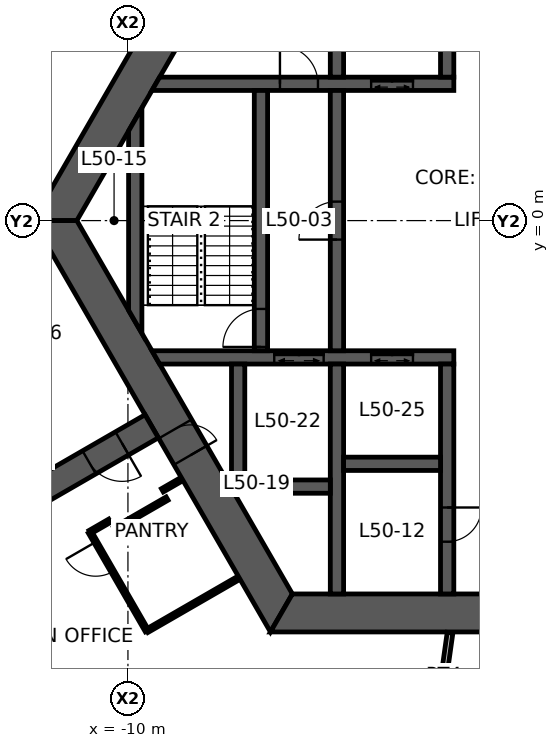
"""IFC4 building model, lengths in metres.
Left out: names, types, materials, properties, quantities, classifications, styles, units other than length and angle.
Written with IfcOpenShell. Run it as: python <this file> out.ifc"""

import sys

from ifc_helpers import new_model, si_unit, direction, frame, frame_2d, origin, place, context, subcontext, project, spatial, polyline, rectangle, outline, extrude, element, fill, save


model = new_model("IFC4")
c1 = context("Model", 3, precision=1e-05, world=origin(), true_north=direction((0.0, 1.0)))
c2 = subcontext(c1, "Body", "Model", "MODEL_VIEW")
j1 = project(units=[si_unit("LENGTHUNIT", "METRE"), si_unit("PLANEANGLEUNIT", "RADIAN")], contexts=[c1])
p1 = place(None, origin())
s1 = spatial("IfcSite", under=j1, at=p1, CompositionType="ELEMENT")
p2 = place(p1, origin())
s2 = spatial("IfcBuilding", under=s1, at=p2, CompositionType="ELEMENT")
p3 = place(p2, frame((0.0, 0.0, 199.4)))
s3 = spatial("IfcBuildingStorey", under=s2, at=p3, CompositionType="ELEMENT", Elevation=199.4)
p4 = place(p3, frame((-5.961, 10.325, 0.0), z_axis=(0.0, 0.0, 1.0), x_axis=(-0.500004296715, -0.866022923061, 0.0)))
e1 = element("IfcWall", 1, at=p4, inside=s3, PredefinedType="SHEAR", context=c2, shape_type="SweptSolid", body=[
    extrude(outline(polyline([(-0.289, -0.5), (4.494, -0.5), (5.494, -0.5), (12.211, -0.5), (11.634, 0.5), (5.494, 0.5), (4.494, 0.5), (0.289, 0.5), (-0.289, -0.5)])), origin(), (0.0, 0.0, 1.0), 3.9),
])
p5 = place(p4, frame((4.494, 0.0, 0.0)))
e2 = element("IfcOpeningElement", 2, at=p5, cuts=e1, PredefinedType="OPENING", context=c2, shape_type="SweptSolid", body=[
    extrude(rectangle(XDim=1.0, YDim=2.1, at=frame_2d((0.5, 1.05))), frame((0.0, 0.51, 0.0), z_axis=(0.0, -1.0, 0.0), x_axis=(1.0, 0.0, 0.0)), (0.0, 0.0, 1.0), 1.02),
])
p6 = place(p3, frame((-11.922, 0.0, 0.0), z_axis=(0.0, 0.0, 1.0), x_axis=(0.500004296715, -0.866022923061, 0.0)))
e3 = element("IfcWall", 3, at=p6, inside=s3, PredefinedType="SHEAR", context=c2, shape_type="SweptSolid", body=[
    extrude(outline(polyline([(-0.289, -0.5), (6.331, -0.5), (7.131, -0.5), (12.211, -0.5), (11.634, 0.5), (7.131, 0.5), (6.331, 0.5), (0.289, 0.5), (-0.289, -0.5)])), origin(), (0.0, 0.0, 1.0), 3.9),
])
p7 = place(p6, frame((6.331, 0.0, 0.0)))
e4 = element("IfcOpeningElement", 4, at=p7, cuts=e3, PredefinedType="OPENING", context=c2, shape_type="SweptSolid", body=[
    extrude(rectangle(XDim=0.8, YDim=2.1, at=frame_2d((0.4, 1.05))), frame((0.0, 0.51, 0.0), z_axis=(0.0, -1.0, 0.0), x_axis=(1.0, 0.0, 0.0)), (0.0, 0.0, 1.0), 1.02),
])
p8 = place(p3, frame((-5.961, -10.325, 0.0), z_axis=(0.0, 0.0, 1.0), x_axis=(1.0, 0.0, 0.0)))
e5 = element("IfcWall", 5, at=p8, inside=s3, PredefinedType="SHEAR", context=c2, shape_type="SweptSolid", body=[
    extrude(outline(polyline([(-0.289, -0.5), (5.461, -0.5), (6.461, -0.5), (12.211, -0.5), (11.634, 0.5), (6.461, 0.5), (5.461, 0.5), (0.289, 0.5), (-0.289, -0.5)])), origin(), (0.0, 0.0, 1.0), 3.9),
])
p9 = place(p8, frame((5.461, 0.0, 0.0)))
e6 = element("IfcOpeningElement", 6, at=p9, cuts=e5, PredefinedType="OPENING", context=c2, shape_type="SweptSolid", body=[
    extrude(rectangle(XDim=1.0, YDim=2.1, at=frame_2d((0.5, 1.05))), frame((0.0, 0.51, 0.0), z_axis=(0.0, -1.0, 0.0), x_axis=(1.0, 0.0, 0.0)), (0.0, 0.0, 1.0), 1.02),
])
p10 = place(p3, frame((-9.375, -5.413, 0.0), z_axis=(0.0, 0.0, 1.0), x_axis=(-0.866032377459, -0.499987921047, 0.0)))
e7 = element("IfcWall", 7, at=p10, inside=s3, PredefinedType="SHEAR", context=c2, shape_type="SweptSolid", body=[
    extrude(rectangle(XDim=7.696, YDim=0.7, at=frame_2d((3.848, 0.0))), origin(), (0.0, 0.0, 1.0), 3.9),
])
p11 = place(p10, frame((0.9, 0.0, 0.0)))
e8 = element("IfcOpeningElement", 8, at=p11, cuts=e7, PredefinedType="OPENING", context=c2, shape_type="SweptSolid", body=[
    extrude(rectangle(XDim=1.0, YDim=2.1, at=frame_2d((0.5, 1.05))), frame((0.0, 0.36, 0.0), z_axis=(0.0, -1.0, 0.0), x_axis=(1.0, 0.0, 0.0)), (0.0, 0.0, 1.0), 0.72),
])
p12 = place(p3, frame((-9.266, 3.6, 0.0), z_axis=(0.0, 0.0, 1.0), x_axis=(1.0, 0.0, 0.0)))
e9 = element("IfcWall", 9, at=p12, inside=s3, PredefinedType="SHEAR", context=c2, shape_type="SweptSolid", body=[
    extrude(outline(polyline([(-0.101, -0.175), (3.266, -0.175), (4.266, -0.175), (5.667, -0.175), (6.767, -0.175), (7.841, -0.175), (7.841, 0.175), (6.767, 0.175), (5.667, 0.175), (4.266, 0.175), (3.266, 0.175), (0.101, 0.175), (-0.101, -0.175)])), origin(), (0.0, 0.0, 1.0), 3.9),
])
p13 = place(p12, frame((3.266, 0.0, 0.0)))
e10 = element("IfcOpeningElement", 10, at=p13, cuts=e9, PredefinedType="OPENING", context=c2, shape_type="SweptSolid", body=[
    extrude(rectangle(XDim=1.0, YDim=2.1, at=frame_2d((0.5, 1.05))), frame((0.0, 0.185, 0.0), z_axis=(0.0, -1.0, 0.0), x_axis=(1.0, 0.0, 0.0)), (0.0, 0.0, 1.0), 0.37),
])
p14 = place(p12, frame((5.667, 0.0, 0.0)))
e11 = element("IfcOpeningElement", 11, at=p14, cuts=e9, PredefinedType="OPENING", context=c2, shape_type="SweptSolid", body=[
    extrude(rectangle(XDim=1.1, YDim=2.1, at=frame_2d((0.55, 1.05))), frame((0.0, 0.185, 0.0), z_axis=(0.0, -1.0, 0.0), x_axis=(1.0, 0.0, 0.0)), (0.0, 0.0, 1.0), 0.37),
])
p15 = place(p3, frame((-9.266, -3.6, 0.0), z_axis=(0.0, 0.0, 1.0), x_axis=(1.0, 0.0, 0.0)))
e12 = element("IfcWall", 12, at=p15, inside=s3, PredefinedType="SHEAR", context=c2, shape_type="SweptSolid", body=[
    extrude(outline(polyline([(0.101, -0.175), (3.116, -0.175), (4.417, -0.175), (5.667, -0.175), (6.767, -0.175), (7.841, -0.175), (7.841, 0.175), (6.767, 0.175), (5.667, 0.175), (4.417, 0.175), (3.116, 0.175), (-0.101, 0.175), (0.101, -0.175)])), origin(), (0.0, 0.0, 1.0), 3.9),
])
p16 = place(p15, frame((5.667, 0.0, 0.0)))
e13 = element("IfcOpeningElement", 13, at=p16, cuts=e12, PredefinedType="OPENING", context=c2, shape_type="SweptSolid", body=[
    extrude(rectangle(XDim=1.1, YDim=2.1, at=frame_2d((0.55, 1.05))), frame((0.0, 0.185, 0.0), z_axis=(0.0, -1.0, 0.0), x_axis=(1.0, 0.0, 0.0)), (0.0, 0.0, 1.0), 0.37),
])
p17 = place(p15, frame((3.116, 0.0, 0.0)))
e14 = element("IfcOpeningElement", 14, at=p17, cuts=e12, PredefinedType="OPENING", context=c2, shape_type="SweptSolid", body=[
    extrude(rectangle(XDim=1.3, YDim=2.1, at=frame_2d((0.65, 1.05))), frame((0.0, 0.185, 0.0), z_axis=(0.0, -1.0, 0.0), x_axis=(1.0, 0.0, 0.0)), (0.0, 0.0, 1.0), 0.37),
])
p18 = place(p3, frame((-1.6, 3.775, 0.0), z_axis=(0.0, 0.0, 1.0), x_axis=(0.0, 1.0, 0.0)))
e15 = element("IfcWall", 15, at=p18, inside=s3, PredefinedType="SHEAR", context=c2, shape_type="SweptSolid", body=[
    extrude(rectangle(XDim=6.05, YDim=0.35, at=frame_2d((3.025, 0.0))), origin(), (0.0, 0.0, 1.0), 3.9),
])
p19 = place(p18, frame((3.775, 0.0, 0.0)))
e16 = element("IfcOpeningElement", 16, at=p19, cuts=e15, PredefinedType="OPENING", context=c2, shape_type="SweptSolid", body=[
    extrude(rectangle(XDim=0.9, YDim=2.1, at=frame_2d((0.45, 1.05))), frame((0.0, 0.185, 0.0), z_axis=(0.0, -1.0, 0.0), x_axis=(1.0, 0.0, 0.0)), (0.0, 0.0, 1.0), 0.37),
])
p20 = place(p3, frame((-1.6, -3.775, 0.0), z_axis=(0.0, 0.0, 1.0), x_axis=(0.0, -1.0, 0.0)))
e17 = element("IfcWall", 17, at=p20, inside=s3, PredefinedType="SHEAR", context=c2, shape_type="SweptSolid", body=[
    extrude(rectangle(XDim=6.05, YDim=0.35, at=frame_2d((3.025, 0.0))), origin(), (0.0, 0.0, 1.0), 3.9),
])
p21 = place(p20, frame((3.775, 0.0, 0.0)))
e18 = element("IfcOpeningElement", 18, at=p21, cuts=e17, PredefinedType="OPENING", context=c2, shape_type="SweptSolid", body=[
    extrude(rectangle(XDim=0.9, YDim=2.1, at=frame_2d((0.45, 1.05))), frame((0.0, 0.185, 0.0), z_axis=(0.0, -1.0, 0.0), x_axis=(1.0, 0.0, 0.0)), (0.0, 0.0, 1.0), 0.37),
])
p22 = place(p3, frame((-4.5, -3.425, 0.0), z_axis=(0.0, 0.0, 1.0), x_axis=(0.0, 1.0, 0.0)))
e19 = element("IfcWall", 19, at=p22, inside=s3, PredefinedType="SHEAR", context=c2, shape_type="SweptSolid", body=[
    extrude(rectangle(XDim=6.85, YDim=0.35, at=frame_2d((3.425, 0.0))), origin(), (0.0, 0.0, 1.0), 3.9),
])
p23 = place(p22, frame((2.925, 0.0, 0.0)))
e20 = element("IfcOpeningElement", 20, at=p23, cuts=e19, PredefinedType="OPENING", context=c2, shape_type="SweptSolid", body=[
    extrude(rectangle(XDim=1.0, YDim=2.1, at=frame_2d((0.5, 1.05))), frame((0.0, 0.185, 0.0), z_axis=(0.0, -1.0, 0.0), x_axis=(1.0, 0.0, 0.0)), (0.0, 0.0, 1.0), 0.37),
])
p24 = place(p3, frame((-6.5, -3.425, 0.0), z_axis=(0.0, 0.0, 1.0), x_axis=(0.0, 1.0, 0.0)))
e21 = element("IfcWall", 21, at=p24, inside=s3, PredefinedType="SHEAR", context=c2, shape_type="SweptSolid", body=[
    extrude(rectangle(XDim=6.85, YDim=0.35, at=frame_2d((3.425, 0.0))), origin(), (0.0, 0.0, 1.0), 3.9),
])
p25 = place(p24, frame((0.1, 0.0, 0.0)))
e22 = element("IfcOpeningElement", 22, at=p25, cuts=e21, PredefinedType="OPENING", context=c2, shape_type="SweptSolid", body=[
    extrude(rectangle(XDim=1.0, YDim=2.1, at=frame_2d((0.5, 1.05))), frame((0.0, 0.185, 0.0), z_axis=(0.0, -1.0, 0.0), x_axis=(1.0, 0.0, 0.0)), (0.0, 0.0, 1.0), 0.37),
])
for number, where, z_axis, x_axis in (
    (23, (-4.5, 3.775, 0.0), (0.0, 0.0, 1.0), (0.0, 1.0, 0.0)),
    (24, (-4.5, -3.775, 0.0), (0.0, 0.0, 1.0), (0.0, -1.0, 0.0)),
):
    element("IfcWall", number, at=place(p3, frame(where, z_axis=z_axis, x_axis=x_axis)), inside=s3, PredefinedType="SHEAR", context=c2, shape_type="SweptSolid", body=[
        extrude(rectangle(XDim=6.05, YDim=0.35, at=frame_2d((3.025, 0.0))), origin(), (0.0, 0.0, 1.0), 3.9),
    ])
p26 = place(p3, frame((-4.325, -6.4, 0.0), z_axis=(0.0, 0.0, 1.0), x_axis=(1.0, 0.0, 0.0)))
e25 = element("IfcWall", 25, at=p26, inside=s3, PredefinedType="SHEAR", context=c2, shape_type="SweptSolid", body=[
    extrude(rectangle(XDim=2.55, YDim=0.35, at=frame_2d((1.275, 0.0))), origin(), (0.0, 0.0, 1.0), 3.9),
])
p27 = place(p3, frame((-6.925, -7.0, 0.0), z_axis=(0.0, 0.0, 1.0), x_axis=(1.0, 0.0, 0.0)))
e26 = element("IfcWall", 26, at=p27, inside=s3, PredefinedType="SHEAR", context=c2, shape_type="SweptSolid", body=[
    extrude(rectangle(XDim=2.25, YDim=0.35, at=frame_2d((1.125, 0.0))), origin(), (0.0, 0.0, 1.0), 3.9),
])
p28 = place(p3, frame((-7.1, -3.775, 0.0), z_axis=(0.0, 0.0, 1.0), x_axis=(0.0, -1.0, 0.0)))
e27 = element("IfcWall", 27, at=p28, inside=s3, PredefinedType="SHEAR", context=c2, shape_type="SweptSolid", body=[
    extrude(outline(polyline([(0.0, -0.175), (3.274, -0.175), (3.4, 0.0), (3.4, 0.175), (0.0, 0.175), (0.0, -0.175)])), origin(), (0.0, 0.0, 1.0), 3.9),
])
p29 = place(p3, frame((-9.808, -2.662, 0.0), z_axis=(0.0, 0.0, 1.0), x_axis=(0.0, 1.0, 0.0)))
e28 = element("IfcWall", 28, at=p29, inside=s3, PredefinedType="SHEAR", context=c2, shape_type="SweptSolid", body=[
    extrude(outline(polyline([(-0.303, -0.175), (5.628, -0.175), (5.021, 0.175), (0.303, 0.175), (-0.303, -0.175)])), origin(), (0.0, 0.0, 1.0), 3.9),
])
p30 = place(p3, frame((-15.156, 0.0, 0.0), z_axis=(0.0, 0.0, 1.0), x_axis=(0.500012970505, 0.86601791513, 0.0)))
e29 = element("IfcWall", 29, at=p30, inside=s3, PredefinedType="PARTITIONING", context=c2, shape_type="SweptSolid", body=[
    extrude(rectangle(XDim=11.591, YDim=0.15, at=frame_2d((5.795, 0.0))), origin(), (0.0, 0.0, 1.0), 2.35),
])
p31 = place(p30, frame((5.295, 0.0, 0.0)))
e30 = element("IfcOpeningElement", 30, at=p31, cuts=e29, PredefinedType="OPENING", context=c2, shape_type="SweptSolid", body=[
    extrude(rectangle(XDim=1.0, YDim=2.1, at=frame_2d((0.5, 1.05))), frame((0.0, 0.085, 0.0), z_axis=(0.0, -1.0, 0.0), x_axis=(1.0, 0.0, 0.0)), (0.0, 0.0, 1.0), 0.17),
])
p32 = place(p3, frame((-11.0, -8.198, 0.0), z_axis=(0.0, 0.0, 1.0), x_axis=(0.866131372301, 0.499816412211, 0.0)))
e31 = element("IfcWall", 31, at=p32, inside=s3, PredefinedType="PARTITIONING", context=c2, shape_type="SweptSolid", body=[
    extrude(rectangle(XDim=0.6, YDim=0.1, at=frame_2d((0.3, 0.0))), origin(), (0.0, 0.0, 1.0), 2.35),
])
p33 = place(p3, frame((-10.355, -8.115, 0.0), z_axis=(0.0, 0.0, 1.0), x_axis=(0.866094119867, 0.499880961361, 0.0)))
e32 = element("IfcWall", 32, at=p33, inside=s3, PredefinedType="PARTITIONING", context=c2, shape_type="SweptSolid", body=[
    extrude(rectangle(XDim=1.6, YDim=0.1, at=frame_2d((0.8, 0.0))), origin(), (0.0, 0.0, 1.0), 2.35),
])
p34 = place(p3, frame((-9.5, -10.796, 0.0), z_axis=(0.0, 0.0, 1.0), x_axis=(-0.499990139034, 0.866031096941, 0.0)))
e33 = element("IfcWall", 33, at=p34, inside=s3, PredefinedType="PARTITIONING", context=c2, shape_type="SweptSolid", body=[
    extrude(rectangle(XDim=3.0, YDim=0.1, at=frame_2d((1.5, 0.0))), origin(), (0.0, 0.0, 1.0), 2.35),
])
p35 = place(p34, frame((1.8, 0.0, 0.0)))
e34 = element("IfcOpeningElement", 34, at=p35, cuts=e33, PredefinedType="OPENING", context=c2, shape_type="SweptSolid", body=[
    extrude(rectangle(XDim=0.9, YDim=2.1, at=frame_2d((0.45, 1.05))), frame((0.0, 0.06, 0.0), z_axis=(0.0, -1.0, 0.0), x_axis=(1.0, 0.0, 0.0)), (0.0, 0.0, 1.0), 0.12),
])
p36 = place(p3, frame((-9.094, -7.098, 0.0), z_axis=(0.0, 0.0, 1.0), x_axis=(0.865954211699, 0.50012328804, 0.0)))
e35 = element("IfcWall", 35, at=p36, inside=s3, PredefinedType="PARTITIONING", context=c2, shape_type="SweptSolid", body=[
    extrude(rectangle(XDim=0.58, YDim=0.1, at=frame_2d((0.29, 0.0))), origin(), (0.0, 0.0, 1.0), 2.35),
])
p37 = place(p3, frame((-7.092, -9.406, 0.0), z_axis=(0.0, 0.0, 1.0), x_axis=(-0.86603494908, -0.499983466698, 0.0)))
e36 = element("IfcWall", 36, at=p37, inside=s3, PredefinedType="PARTITIONING", context=c2, shape_type="SweptSolid", body=[
    extrude(rectangle(XDim=2.78, YDim=0.1, at=frame_2d((1.39, 0.0))), origin(), (0.0, 0.0, 1.0), 2.35),
])
p38 = place(p3, frame((-1.844, -13.125, 0.0), z_axis=(0.0, 0.0, 1.0), x_axis=(0.139119980631, 0.990275532864, 0.0)))
e37 = element("IfcWall", 37, at=p38, inside=s3, PredefinedType="PARTITIONING", context=c2, shape_type="SweptSolid", body=[
    extrude(rectangle(XDim=2.302, YDim=0.15, at=frame_2d((1.151, 0.0))), origin(), (0.0, 0.0, 1.0), 2.35),
])
p39 = place(p7, origin())
e38 = element("IfcDoor", 38, at=p39, inside=s3, OperationType="SINGLE_SWING_RIGHT", PredefinedType="DOOR", context=c2, shape_type="SweptSolid", body=[
    extrude(rectangle(XDim=0.8, YDim=2.1, at=frame_2d((0.4, 1.05))), frame((0.0, 0.025, 0.0), z_axis=(0.0, -1.0, 0.0), x_axis=(1.0, 0.0, 0.0)), (0.0, 0.0, 1.0), 0.05),
])
fill(e4, e38)
p40 = place(p23, origin())
e39 = element("IfcDoor", 39, at=p40, inside=s3, OperationType="SINGLE_SWING_LEFT", PredefinedType="DOOR", context=c2, shape_type="SweptSolid", body=[
    extrude(rectangle(XDim=1.0, YDim=2.1, at=frame_2d((0.5, 1.05))), frame((0.0, 0.025, 0.0), z_axis=(0.0, -1.0, 0.0), x_axis=(1.0, 0.0, 0.0)), (0.0, 0.0, 1.0), 0.05),
])
fill(e20, e39)
p41 = place(p25, origin())
e40 = element("IfcDoor", 40, at=p41, inside=s3, OperationType="SINGLE_SWING_LEFT", PredefinedType="DOOR", context=c2, shape_type="SweptSolid", body=[
    extrude(rectangle(XDim=1.0, YDim=2.1, at=frame_2d((0.5, 1.05))), frame((0.0, 0.025, 0.0), z_axis=(0.0, -1.0, 0.0), x_axis=(1.0, 0.0, 0.0)), (0.0, 0.0, 1.0), 0.05),
])
fill(e22, e40)
p42 = place(p13, origin())
e41 = element("IfcDoor", 41, at=p42, inside=s3, OperationType="SINGLE_SWING_LEFT", PredefinedType="DOOR", context=c2, shape_type="SweptSolid", body=[
    extrude(rectangle(XDim=1.0, YDim=2.1, at=frame_2d((0.5, 1.05))), frame((0.0, 0.025, 0.0), z_axis=(0.0, -1.0, 0.0), x_axis=(1.0, 0.0, 0.0)), (0.0, 0.0, 1.0), 0.05),
])
fill(e10, e41)
p43 = place(p21, origin())
e42 = element("IfcDoor", 42, at=p43, inside=s3, OperationType="SINGLE_SWING_LEFT", PredefinedType="DOOR", context=c2, shape_type="SweptSolid", body=[
    extrude(rectangle(XDim=0.9, YDim=2.1, at=frame_2d((0.45, 1.05))), frame((0.0, 0.025, 0.0), z_axis=(0.0, -1.0, 0.0), x_axis=(1.0, 0.0, 0.0)), (0.0, 0.0, 1.0), 0.05),
])
fill(e18, e42)
p44 = place(p11, origin())
e43 = element("IfcDoor", 43, at=p44, inside=s3, OperationType="SINGLE_SWING_LEFT", PredefinedType="DOOR", context=c2, shape_type="SweptSolid", body=[
    extrude(rectangle(XDim=1.0, YDim=2.1, at=frame_2d((0.5, 1.05))), frame((0.0, 0.025, 0.0), z_axis=(0.0, -1.0, 0.0), x_axis=(1.0, 0.0, 0.0)), (0.0, 0.0, 1.0), 0.05),
])
fill(e8, e43)
p45 = place(p35, origin())
e44 = element("IfcDoor", 44, at=p45, inside=s3, OperationType="SINGLE_SWING_RIGHT", PredefinedType="DOOR", context=c2, shape_type="SweptSolid", body=[
    extrude(rectangle(XDim=0.9, YDim=2.1, at=frame_2d((0.45, 1.05))), frame((0.0, 0.025, 0.0), z_axis=(0.0, -1.0, 0.0), x_axis=(1.0, 0.0, 0.0)), (0.0, 0.0, 1.0), 0.05),
])
fill(e34, e44)
p46 = place(p14, origin())
e45 = element("IfcDoor", 45, at=p46, inside=s3, OperationType="DOUBLE_DOOR_SLIDING", PredefinedType="DOOR", context=c2, shape_type="SweptSolid", body=[
    extrude(rectangle(XDim=1.1, YDim=2.1, at=frame_2d((0.55, 1.05))), frame((0.0, 0.025, 0.0), z_axis=(0.0, -1.0, 0.0), x_axis=(1.0, 0.0, 0.0)), (0.0, 0.0, 1.0), 0.05),
])
fill(e11, e45)
p47 = place(p16, origin())
e46 = element("IfcDoor", 46, at=p47, inside=s3, OperationType="DOUBLE_DOOR_SLIDING", PredefinedType="DOOR", context=c2, shape_type="SweptSolid", body=[
    extrude(rectangle(XDim=1.1, YDim=2.1, at=frame_2d((0.55, 1.05))), frame((0.0, 0.025, 0.0), z_axis=(0.0, -1.0, 0.0), x_axis=(1.0, 0.0, 0.0)), (0.0, 0.0, 1.0), 0.05),
])
fill(e13, e46)
p48 = place(p17, origin())
e47 = element("IfcDoor", 47, at=p48, inside=s3, OperationType="DOUBLE_DOOR_SLIDING", PredefinedType="DOOR", context=c2, shape_type="SweptSolid", body=[
    extrude(rectangle(XDim=1.3, YDim=2.1, at=frame_2d((0.65, 1.05))), frame((0.0, 0.025, 0.0), z_axis=(0.0, -1.0, 0.0), x_axis=(1.0, 0.0, 0.0)), (0.0, 0.0, 1.0), 0.05),
])
fill(e14, e47)
save(model, sys.argv[1])
